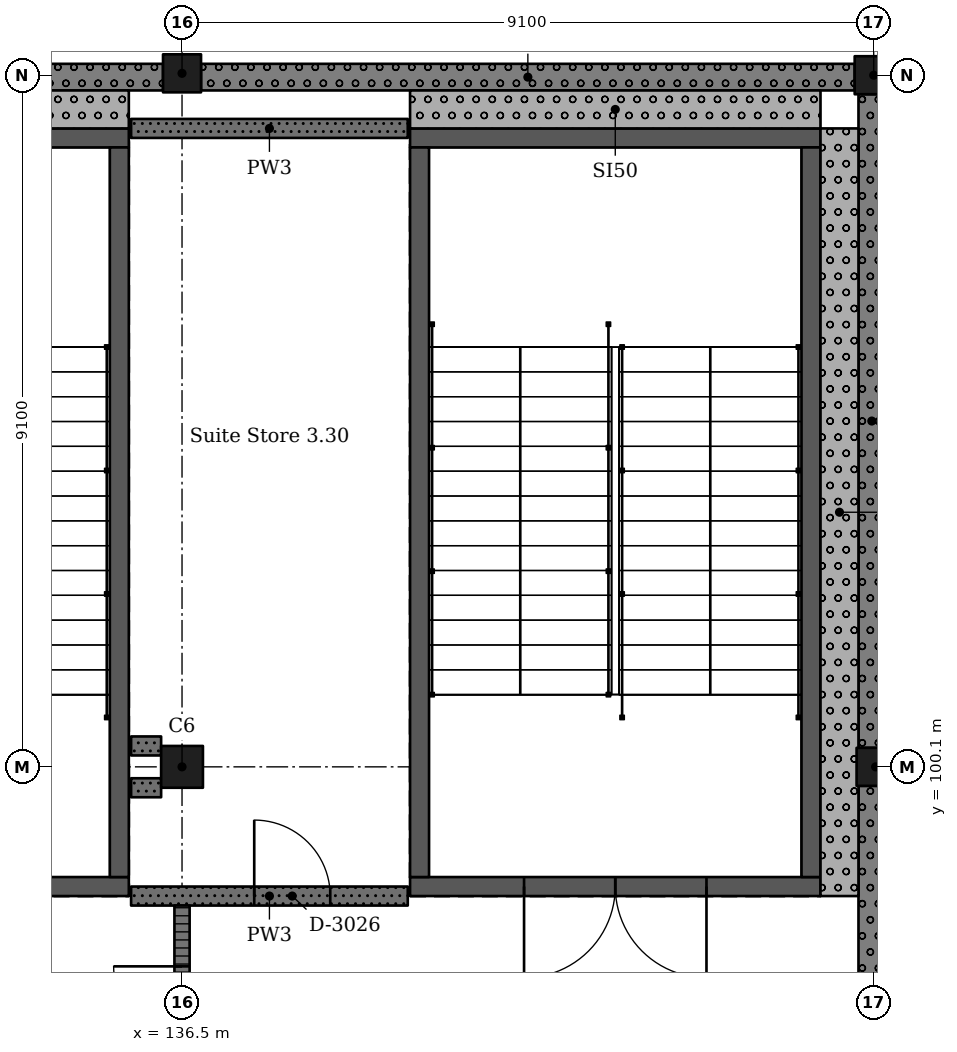
"""IFC4 building model, lengths in metres.
Left out: names, types, materials, properties, quantities, classifications, styles, units other than length and angle.
Written with IfcOpenShell. Run it as: python <this file> out.ifc"""

import sys

from ifc_helpers import new_model, si_unit, direction, frame, frame_2d, origin, origin_2d, place, context, subcontext, project, spatial, rectangle, extrude, element, fill, save


model = new_model("IFC4")
c1 = context("Model", 3, precision=1e-05, world=origin(), true_north=direction((0.0, 1.0)))
c2 = subcontext(c1, "Body", "Model", "MODEL_VIEW")
j1 = project(units=[si_unit("LENGTHUNIT", "METRE"), si_unit("PLANEANGLEUNIT", "RADIAN")], contexts=[c1])
p1 = place(None, origin())
s1 = spatial("IfcSite", under=j1, at=p1, CompositionType="ELEMENT")
p2 = place(p1, origin())
s2 = spatial("IfcBuilding", under=s1, at=p2, CompositionType="ELEMENT")
p3 = place(p2, frame((0.0, 0.0, 15.47)))
s3 = spatial("IfcBuildingStorey", under=s2, at=p3, CompositionType="ELEMENT", Elevation=15.47)
p4 = place(p3, frame((136.5, 100.1, 0.0), z_axis=(0.0, 0.0, 1.0), x_axis=(1.0, 0.0, 0.0)))
e1 = element("IfcColumn", 1, at=p4, inside=s3, PredefinedType="COLUMN", context=c2, shape_type="SweptSolid", body=[
    extrude(rectangle(XDim=0.55, YDim=0.55, at=origin_2d()), origin(), (0.0, 0.0, 1.0), 4.55),
])
for number, where, z_axis, x_axis in (
    (2, (136.5, 109.225, 0.0), (0.0, 0.0, 1.0), (1.0, 0.0, 0.0)),
    (3, (145.625, 100.1, 0.0), (0.0, 0.0, 1.0), (1.0, 0.0, 0.0)),
    (4, (145.6, 109.2, 0.0), (0.0, 0.0, 1.0), (1.0, 0.0, 0.0)),
):
    element("IfcColumn", number, at=place(p3, frame(where, z_axis=z_axis, x_axis=x_axis)), inside=s3, PredefinedType="COLUMN", context=c2, shape_type="SweptSolid", body=[
        extrude(rectangle(XDim=0.5, YDim=0.5, at=origin_2d()), origin(), (0.0, 0.0, 1.0), 4.55),
    ])
p5 = place(p3, frame((144.9, 98.525, 0.0), z_axis=(0.0, 0.0, 1.0), x_axis=(-1.0, 0.0, 0.0)))
e5 = element("IfcWall", 5, at=p5, inside=s3, PredefinedType="SHEAR", context=c2, shape_type="SweptSolid", body=[
    extrude(rectangle(XDim=5.4, YDim=0.25, at=frame_2d((2.7, 0.0))), origin(), (0.0, 0.0, 1.0), 4.55),
])
p6 = place(p5, frame((1.5, 0.0, 0.0)))
e6 = element("IfcOpeningElement", 6, at=p6, cuts=e5, PredefinedType="OPENING", context=c2, shape_type="SweptSolid", body=[
    extrude(rectangle(XDim=2.4, YDim=2.1, at=frame_2d((1.2, 1.05))), frame((0.0, 0.135, 0.0), z_axis=(0.0, -1.0, 0.0), x_axis=(1.0, 0.0, 0.0)), (0.0, 0.0, 1.0), 0.27),
])
p7 = place(p3, frame((144.9, 108.375, 0.0), z_axis=(0.0, 0.0, 1.0), x_axis=(-1.0, 0.0, 0.0)))
e7 = element("IfcWall", 7, at=p7, inside=s3, PredefinedType="SHEAR", context=c2, shape_type="SweptSolid", body=[
    extrude(rectangle(XDim=5.4, YDim=0.25, at=frame_2d((2.7, 0.0))), origin(), (0.0, 0.0, 1.0), 4.55),
])
for number, where, z_axis, x_axis in (
    (8, (139.625, 108.25, 0.0), (0.0, 0.0, 1.0), (0.0, -1.0, 0.0)),
    (9, (144.775, 108.25, 0.0), (0.0, 0.0, 1.0), (0.0, -1.0, 0.0)),
):
    element("IfcWall", number, at=place(p3, frame(where, z_axis=z_axis, x_axis=x_axis)), inside=s3, PredefinedType="SHEAR", context=c2, shape_type="SweptSolid", body=[
        extrude(rectangle(XDim=9.6, YDim=0.25, at=frame_2d((4.8, 0.0))), origin(), (0.0, 0.0, 1.0), 4.55),
    ])
p8 = place(p3, frame((135.8, 98.525, 0.0), z_axis=(0.0, 0.0, 1.0), x_axis=(-1.0, 0.0, 0.0)))
e10 = element("IfcWall", 10, at=p8, inside=s3, PredefinedType="SHEAR", context=c2, shape_type="SweptSolid", body=[
    extrude(rectangle(XDim=5.4, YDim=0.25, at=frame_2d((2.7, 0.0))), origin(), (0.0, 0.0, 1.0), 4.55),
])
p9 = place(p8, frame((1.5, 0.0, 0.0)))
e11 = element("IfcOpeningElement", 11, at=p9, cuts=e10, PredefinedType="OPENING", context=c2, shape_type="SweptSolid", body=[
    extrude(rectangle(XDim=2.4, YDim=2.1, at=frame_2d((1.2, 1.05))), frame((0.0, 0.135, 0.0), z_axis=(0.0, -1.0, 0.0), x_axis=(1.0, 0.0, 0.0)), (0.0, 0.0, 1.0), 0.27),
])
p10 = place(p3, frame((135.8, 108.375, 0.0), z_axis=(0.0, 0.0, 1.0), x_axis=(-1.0, 0.0, 0.0)))
e12 = element("IfcWall", 12, at=p10, inside=s3, PredefinedType="SHEAR", context=c2, shape_type="SweptSolid", body=[
    extrude(rectangle(XDim=5.4, YDim=0.25, at=frame_2d((2.7, 0.0))), origin(), (0.0, 0.0, 1.0), 4.55),
])
p11 = place(p3, frame((135.675, 108.25, 0.0), z_axis=(0.0, 0.0, 1.0), x_axis=(0.0, -1.0, 0.0)))
e13 = element("IfcWall", 13, at=p11, inside=s3, PredefinedType="SHEAR", context=c2, shape_type="SweptSolid", body=[
    extrude(rectangle(XDim=9.6, YDim=0.25, at=frame_2d((4.8, 0.0))), origin(), (0.0, 0.0, 1.0), 4.55),
])
p12 = place(p3, frame((145.575, 91.25, 0.0), z_axis=(0.0, 0.0, 1.0), x_axis=(0.0, 1.0, 0.0)))
e14 = element("IfcWall", 14, at=p12, inside=s3, PredefinedType="SOLIDWALL", context=c2, shape_type="SweptSolid", body=[
    extrude(rectangle(XDim=8.6, YDim=0.35, at=frame_2d((4.3, 0.0))), origin(), (0.0, 0.0, 1.0), 3.55),
])
p13 = place(p3, frame((145.575, 100.35, 0.0), z_axis=(0.0, 0.0, 1.0), x_axis=(0.0, 1.0, 0.0)))
e15 = element("IfcWall", 15, at=p13, inside=s3, PredefinedType="SOLIDWALL", context=c2, shape_type="SweptSolid", body=[
    extrude(rectangle(XDim=8.6, YDim=0.35, at=frame_2d((4.3, 0.0))), origin(), (0.0, 0.0, 1.0), 3.55),
])
for number, where, z_axis, x_axis in (
    (16, (145.35, 109.175, 0.0), (0.0, 0.0, 1.0), (-1.0, 0.0, 0.0)),
    (17, (136.25, 109.175, 0.0), (0.0, 0.0, 1.0), (-1.0, 0.0, 0.0)),
):
    element("IfcWall", number, at=place(p3, frame(where, z_axis=z_axis, x_axis=x_axis)), inside=s3, PredefinedType="SOLIDWALL", context=c2, shape_type="SweptSolid", body=[
        extrude(rectangle(XDim=8.6, YDim=0.35, at=frame_2d((4.3, 0.0))), origin(), (0.0, 0.0, 1.0), 3.55),
    ])
p14 = place(p3, frame((139.5, 108.75, 0.0), z_axis=(0.0, 0.0, 1.0), x_axis=(1.0, 0.0, 0.0)))
e18 = element("IfcWall", 18, at=p14, inside=s3, PredefinedType="SOLIDWALL", context=c2, shape_type="SweptSolid", body=[
    extrude(rectangle(XDim=5.4, YDim=0.5, at=frame_2d((2.7, 0.0))), origin(), (0.0, 0.0, 1.0), 4.3),
])
p15 = place(p3, frame((145.15, 98.4, 0.0), z_axis=(0.0, 0.0, 1.0), x_axis=(0.0, 1.0, 0.0)))
e19 = element("IfcWall", 19, at=p15, inside=s3, PredefinedType="SOLIDWALL", context=c2, shape_type="SweptSolid", body=[
    extrude(rectangle(XDim=10.1, YDim=0.5, at=frame_2d((5.05, 0.0))), origin(), (0.0, 0.0, 1.0), 4.55),
])
p16 = place(p3, frame((130.4, 108.75, 0.0), z_axis=(0.0, 0.0, 1.0), x_axis=(1.0, 0.0, 0.0)))
e20 = element("IfcWall", 20, at=p16, inside=s3, PredefinedType="SOLIDWALL", context=c2, shape_type="SweptSolid", body=[
    extrude(rectangle(XDim=5.4, YDim=0.5, at=frame_2d((2.7, 0.0))), origin(), (0.0, 0.0, 1.0), 4.3),
])
p17 = place(p3, frame((135.83, 98.4, 0.0), z_axis=(0.0, 0.0, 1.0), x_axis=(1.0, 0.0, 0.0)))
e21 = element("IfcWall", 21, at=p17, inside=s3, PredefinedType="SOLIDWALL", context=c2, shape_type="SweptSolid", body=[
    extrude(rectangle(XDim=3.64, YDim=0.25, at=frame_2d((1.82, 0.0))), origin(), (0.0, 0.0, 1.0), 4.3),
])
p18 = place(p17, frame((1.62, 0.0, 0.0)))
e22 = element("IfcOpeningElement", 22, at=p18, cuts=e21, PredefinedType="OPENING", context=c2, shape_type="SweptSolid", body=[
    extrude(rectangle(XDim=1.0, YDim=2.1, at=frame_2d((0.5, 1.05))), frame((0.0, 0.135, 0.0), z_axis=(0.0, -1.0, 0.0), x_axis=(1.0, 0.0, 0.0)), (0.0, 0.0, 1.0), 0.27),
])
p19 = place(p3, frame((135.83, 99.825, 0.0), z_axis=(0.0, 0.0, 1.0), x_axis=(1.0, 0.0, 0.0)))
e23 = element("IfcWall", 23, at=p19, inside=s3, PredefinedType="SOLIDWALL", context=c2, shape_type="SweptSolid", body=[
    extrude(rectangle(XDim=0.395, YDim=0.25, at=frame_2d((0.198, 0.0))), origin(), (0.0, 0.0, 1.0), 4.3),
])
p20 = place(p3, frame((135.83, 108.5, 0.0), z_axis=(0.0, 0.0, 1.0), x_axis=(1.0, 0.0, 0.0)))
e24 = element("IfcWall", 24, at=p20, inside=s3, PredefinedType="SOLIDWALL", context=c2, shape_type="SweptSolid", body=[
    extrude(rectangle(XDim=3.64, YDim=0.25, at=frame_2d((1.82, 0.0))), origin(), (0.0, 0.0, 1.0), 4.3),
])
p21 = place(p3, frame((136.225, 100.375, 0.0), z_axis=(0.0, 0.0, 1.0), x_axis=(-1.0, 0.0, 0.0)))
e25 = element("IfcWall", 25, at=p21, inside=s3, PredefinedType="SOLIDWALL", context=c2, shape_type="SweptSolid", body=[
    extrude(rectangle(XDim=0.395, YDim=0.25, at=frame_2d((0.198, 0.0))), origin(), (0.0, 0.0, 1.0), 4.3),
])
p22 = place(p3, frame((136.5, 91.325, 0.0), z_axis=(0.0, 0.0, 1.0), x_axis=(0.0, 1.0, 0.0)))
e26 = element("IfcWall", 26, at=p22, inside=s3, PredefinedType="PARTITIONING", context=c2, shape_type="SweptSolid", body=[
    extrude(rectangle(XDim=6.95, YDim=0.2, at=frame_2d((3.475, 0.0))), origin(), (0.0, 0.0, 1.0), 3.55),
])
p23 = place(p22, frame((0.85, 0.0, 0.0)))
e27 = element("IfcOpeningElement", 27, at=p23, cuts=e26, PredefinedType="OPENING", context=c2, shape_type="SweptSolid", body=[
    extrude(rectangle(XDim=1.8, YDim=2.4, at=frame_2d((0.9, 1.2))), frame((0.0, 0.11, 0.0), z_axis=(0.0, -1.0, 0.0), x_axis=(1.0, 0.0, 0.0)), (0.0, 0.0, 1.0), 0.22),
])
p24 = place(p22, frame((4.35, 0.0, 0.0)))
e28 = element("IfcOpeningElement", 28, at=p24, cuts=e26, PredefinedType="OPENING", context=c2, shape_type="SweptSolid", body=[
    extrude(rectangle(XDim=1.8, YDim=2.4, at=frame_2d((0.9, 1.2))), frame((0.0, 0.11, 0.0), z_axis=(0.0, -1.0, 0.0), x_axis=(1.0, 0.0, 0.0)), (0.0, 0.0, 1.0), 0.22),
])
p25 = place(p18, origin())
e29 = element("IfcDoor", 29, at=p25, inside=s3, OperationType="SINGLE_SWING_RIGHT", PredefinedType="DOOR", context=c2, shape_type="SweptSolid", body=[
    extrude(rectangle(XDim=1.0, YDim=2.1, at=frame_2d((0.5, 1.05))), frame((0.0, 0.025, 0.0), z_axis=(0.0, -1.0, 0.0), x_axis=(1.0, 0.0, 0.0)), (0.0, 0.0, 1.0), 0.05),
])
fill(e22, e29)
p26 = place(p24, origin())
e30 = element("IfcDoor", 30, at=p26, inside=s3, OperationType="DOUBLE_DOOR_SINGLE_SWING", PredefinedType="DOOR", context=c2, shape_type="SweptSolid", body=[
    extrude(rectangle(XDim=1.8, YDim=2.4, at=frame_2d((0.9, 1.2))), frame((0.0, 0.025, 0.0), z_axis=(0.0, -1.0, 0.0), x_axis=(1.0, 0.0, 0.0)), (0.0, 0.0, 1.0), 0.05),
])
fill(e28, e30)
p27 = place(p6, origin())
e31 = element("IfcDoor", 31, at=p27, inside=s3, OperationType="DOUBLE_DOOR_SINGLE_SWING", PredefinedType="DOOR", context=c2, shape_type="SweptSolid", body=[
    extrude(rectangle(XDim=2.4, YDim=2.1, at=frame_2d((1.2, 1.05))), frame((0.0, 0.025, 0.0), z_axis=(0.0, -1.0, 0.0), x_axis=(1.0, 0.0, 0.0)), (0.0, 0.0, 1.0), 0.05),
])
fill(e6, e31)
save(model, sys.argv[1])
